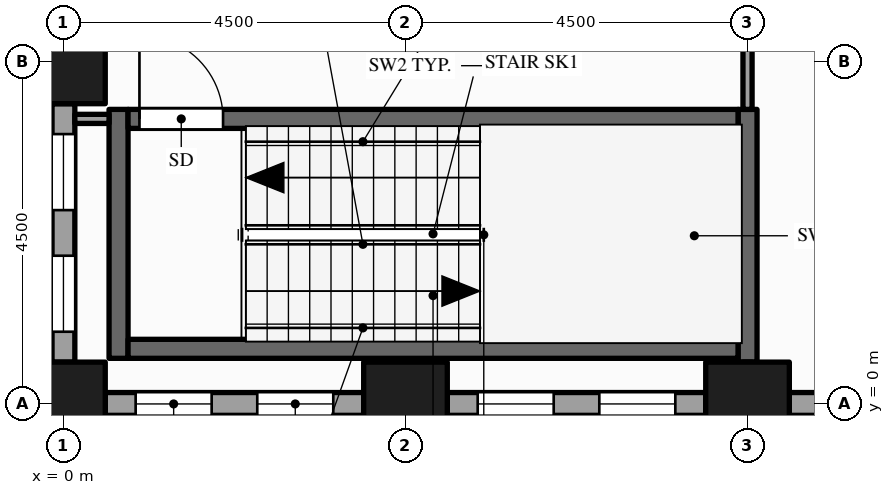
"""IFC4 building model, lengths in metres.
Left out: names, types, materials, properties, quantities, classifications, styles, units other than length and angle.
Written with IfcOpenShell. Run it as: python <this file> out.ifc"""

import sys

from ifc_helpers import new_model, si_unit, direction, frame, frame_2d, origin, origin_2d, place, context, subcontext, project, spatial, rectangle, hollow_rectangle, extrude, element, fill, save


model = new_model("IFC4")
c1 = context("Model", 3, precision=1e-05, world=origin(), true_north=direction((0.0, 1.0)))
c2 = subcontext(c1, "Body", "Model", "MODEL_VIEW")
j1 = project(units=[si_unit("LENGTHUNIT", "METRE"), si_unit("PLANEANGLEUNIT", "RADIAN")], contexts=[c1])
p1 = place(None, origin())
s1 = spatial("IfcSite", under=j1, at=p1, CompositionType="ELEMENT")
p2 = place(p1, origin())
s2 = spatial("IfcBuilding", under=s1, at=p2, CompositionType="ELEMENT")
p3 = place(p2, frame((0.0, 0.0, 49.0)))
s3 = spatial("IfcBuildingStorey", under=s2, at=p3, CompositionType="ELEMENT", Elevation=49.0)
for number, where, z_axis, x_axis in (
    (1, (0.0, 0.0, -0.15), (0.0, 0.0, 1.0), (1.0, 0.0, 0.0)),
    (2, (0.0, 4.5, -0.15), (0.0, 0.0, 1.0), (1.0, 0.0, 0.0)),
    (3, (4.5, 0.0, -0.15), (0.0, 0.0, 1.0), (1.0, 0.0, 0.0)),
    (4, (9.0, 0.0, -0.15), (0.0, 0.0, 1.0), (1.0, 0.0, 0.0)),
):
    element("IfcColumn", number, at=place(p3, frame(where, z_axis=z_axis, x_axis=x_axis)), inside=s3, PredefinedType="COLUMN", context=c2, shape_type="SweptSolid", body=[
        extrude(hollow_rectangle(XDim=1.1, YDim=1.1, WallThickness=0.06, at=origin_2d()), origin(), (0.0, 0.0, 1.0), 4.0),
    ])
p4 = place(p3, frame((0.55, 0.0, 0.0), z_axis=(0.0, 0.0, 1.0), x_axis=(1.0, 0.0, 0.0)))
e5 = element("IfcWall", 5, at=p4, inside=s3, PredefinedType="STANDARD", context=c2, shape_type="SweptSolid", body=[
    extrude(rectangle(XDim=3.4, YDim=0.3, at=frame_2d((1.7, 0.0))), origin(), (0.0, 0.0, 1.0), 3.144),
])
p5 = place(p4, frame((0.4, 0.0, 0.9)))
e6 = element("IfcOpeningElement", 6, at=p5, cuts=e5, PredefinedType="OPENING", context=c2, shape_type="SweptSolid", body=[
    extrude(rectangle(XDim=1.0, YDim=2.0, at=frame_2d((0.5, 1.0))), frame((0.0, 0.16, 0.0), z_axis=(0.0, -1.0, 0.0), x_axis=(1.0, 0.0, 0.0)), (0.0, 0.0, 1.0), 0.32),
])
p6 = place(p4, frame((2.0, 0.0, 0.9)))
e7 = element("IfcOpeningElement", 7, at=p6, cuts=e5, PredefinedType="OPENING", context=c2, shape_type="SweptSolid", body=[
    extrude(rectangle(XDim=1.0, YDim=2.0, at=frame_2d((0.5, 1.0))), frame((0.0, 0.16, 0.0), z_axis=(0.0, -1.0, 0.0), x_axis=(1.0, 0.0, 0.0)), (0.0, 0.0, 1.0), 0.32),
])
p7 = place(p3, frame((5.05, 0.0, 0.0), z_axis=(0.0, 0.0, 1.0), x_axis=(1.0, 0.0, 0.0)))
e8 = element("IfcWall", 8, at=p7, inside=s3, PredefinedType="STANDARD", context=c2, shape_type="SweptSolid", body=[
    extrude(rectangle(XDim=3.4, YDim=0.3, at=frame_2d((1.7, 0.0))), origin(), (0.0, 0.0, 1.0), 3.144),
])
p8 = place(p7, frame((0.4, 0.0, 0.9)))
e9 = element("IfcOpeningElement", 9, at=p8, cuts=e8, PredefinedType="OPENING", context=c2, shape_type="SweptSolid", body=[
    extrude(rectangle(XDim=1.0, YDim=2.0, at=frame_2d((0.5, 1.0))), frame((0.0, 0.16, 0.0), z_axis=(0.0, -1.0, 0.0), x_axis=(1.0, 0.0, 0.0)), (0.0, 0.0, 1.0), 0.32),
])
p9 = place(p7, frame((2.0, 0.0, 0.9)))
e10 = element("IfcOpeningElement", 10, at=p9, cuts=e8, PredefinedType="OPENING", context=c2, shape_type="SweptSolid", body=[
    extrude(rectangle(XDim=1.0, YDim=2.0, at=frame_2d((0.5, 1.0))), frame((0.0, 0.16, 0.0), z_axis=(0.0, -1.0, 0.0), x_axis=(1.0, 0.0, 0.0)), (0.0, 0.0, 1.0), 0.32),
])
p10 = place(p3, frame((9.55, 0.0, 0.0), z_axis=(0.0, 0.0, 1.0), x_axis=(1.0, 0.0, 0.0)))
e11 = element("IfcWall", 11, at=p10, inside=s3, PredefinedType="STANDARD", context=c2, shape_type="SweptSolid", body=[
    extrude(rectangle(XDim=3.4, YDim=0.3, at=frame_2d((1.7, 0.0))), origin(), (0.0, 0.0, 1.0), 3.144),
])
p11 = place(p10, frame((0.4, 0.0, 0.9)))
e12 = element("IfcOpeningElement", 12, at=p11, cuts=e11, PredefinedType="OPENING", context=c2, shape_type="SweptSolid", body=[
    extrude(rectangle(XDim=1.0, YDim=2.0, at=frame_2d((0.5, 1.0))), frame((0.0, 0.16, 0.0), z_axis=(0.0, -1.0, 0.0), x_axis=(1.0, 0.0, 0.0)), (0.0, 0.0, 1.0), 0.32),
])
p12 = place(p10, frame((2.0, 0.0, 0.9)))
e13 = element("IfcOpeningElement", 13, at=p12, cuts=e11, PredefinedType="OPENING", context=c2, shape_type="SweptSolid", body=[
    extrude(rectangle(XDim=1.0, YDim=2.0, at=frame_2d((0.5, 1.0))), frame((0.0, 0.16, 0.0), z_axis=(0.0, -1.0, 0.0), x_axis=(1.0, 0.0, 0.0)), (0.0, 0.0, 1.0), 0.32),
])
p13 = place(p3, frame((0.0, 3.95, 0.0), z_axis=(0.0, 0.0, 1.0), x_axis=(0.0, -1.0, 0.0)))
e14 = element("IfcWall", 14, at=p13, inside=s3, PredefinedType="STANDARD", context=c2, shape_type="SweptSolid", body=[
    extrude(rectangle(XDim=3.4, YDim=0.3, at=frame_2d((1.7, 0.0))), origin(), (0.0, 0.0, 1.0), 3.144),
])
p14 = place(p13, frame((0.4, 0.0, 0.9)))
e15 = element("IfcOpeningElement", 15, at=p14, cuts=e14, PredefinedType="OPENING", context=c2, shape_type="SweptSolid", body=[
    extrude(rectangle(XDim=1.0, YDim=2.0, at=frame_2d((0.5, 1.0))), frame((0.0, 0.16, 0.0), z_axis=(0.0, -1.0, 0.0), x_axis=(1.0, 0.0, 0.0)), (0.0, 0.0, 1.0), 0.32),
])
p15 = place(p13, frame((2.0, 0.0, 0.9)))
e16 = element("IfcOpeningElement", 16, at=p15, cuts=e14, PredefinedType="OPENING", context=c2, shape_type="SweptSolid", body=[
    extrude(rectangle(XDim=1.0, YDim=2.0, at=frame_2d((0.5, 1.0))), frame((0.0, 0.16, 0.0), z_axis=(0.0, -1.0, 0.0), x_axis=(1.0, 0.0, 0.0)), (0.0, 0.0, 1.0), 0.32),
])
p16 = place(p3, frame((0.725, 0.6, 0.0), z_axis=(0.0, 0.0, 1.0), x_axis=(0.0, 1.0, 0.0)))
e17 = element("IfcWall", 17, at=p16, inside=s3, PredefinedType="SHEAR", context=c2, shape_type="SweptSolid", body=[
    extrude(rectangle(XDim=3.275, YDim=0.25, at=frame_2d((1.637, 0.0))), origin(), (0.0, 0.0, 1.0), 3.85),
])
p17 = place(p3, frame((9.0, 0.15, 0.0), z_axis=(0.0, 0.0, 1.0), x_axis=(0.0, 1.0, 0.0)))
e18 = element("IfcWall", 18, at=p17, inside=s3, PredefinedType="PARTITIONING", context=c2, shape_type="SweptSolid", body=[
    extrude(rectangle(XDim=0.4, YDim=0.12, at=frame_2d((0.2, 0.0))), origin(), (0.0, 0.0, 1.0), 3.85),
])
p18 = place(p3, frame((9.0, 0.55, 0.0), z_axis=(0.0, 0.0, 1.0), x_axis=(0.0, 1.0, 0.0)))
e19 = element("IfcWall", 19, at=p18, inside=s3, PredefinedType="SHEAR", context=c2, shape_type="SweptSolid", body=[
    extrude(rectangle(XDim=3.325, YDim=0.25, at=frame_2d((1.663, 0.0))), origin(), (0.0, 0.0, 1.0), 3.85),
])
p19 = place(p3, frame((9.0, 3.875, 0.0), z_axis=(0.0, 0.0, 1.0), x_axis=(0.0, 1.0, 0.0)))
e20 = element("IfcWall", 20, at=p19, inside=s3, PredefinedType="PARTITIONING", context=c2, shape_type="SweptSolid", body=[
    extrude(rectangle(XDim=3.175, YDim=0.12, at=frame_2d((1.587, 0.0))), origin(), (0.0, 0.0, 1.0), 2.938),
])
p20 = place(p3, frame((0.85, 0.725, 0.0), z_axis=(0.0, 0.0, 1.0), x_axis=(1.0, 0.0, 0.0)))
e21 = element("IfcWall", 21, at=p20, inside=s3, PredefinedType="SHEAR", context=c2, shape_type="SweptSolid", body=[
    extrude(rectangle(XDim=8.025, YDim=0.25, at=frame_2d((4.012, 0.0))), origin(), (0.0, 0.0, 1.0), 3.85),
])
p21 = place(p3, frame((0.15, 3.75, 0.0), z_axis=(0.0, 0.0, 1.0), x_axis=(1.0, 0.0, 0.0)))
e22 = element("IfcWall", 22, at=p21, inside=s3, PredefinedType="PARTITIONING", context=c2, shape_type="SweptSolid", body=[
    extrude(rectangle(XDim=0.45, YDim=0.12, at=frame_2d((0.225, 0.0))), origin(), (0.0, 0.0, 1.0), 3.144),
])
p22 = place(p3, frame((0.85, 3.75, 0.0), z_axis=(0.0, 0.0, 1.0), x_axis=(1.0, 0.0, 0.0)))
e23 = element("IfcWall", 23, at=p22, inside=s3, PredefinedType="SHEAR", context=c2, shape_type="SweptSolid", body=[
    extrude(rectangle(XDim=8.025, YDim=0.25, at=frame_2d((4.012, 0.0))), origin(), (0.0, 0.0, 1.0), 3.85),
])
p23 = place(p22, frame((0.15, 0.0, 0.0)))
e24 = element("IfcOpeningElement", 24, at=p23, cuts=e23, PredefinedType="OPENING", context=c2, shape_type="SweptSolid", body=[
    extrude(rectangle(XDim=1.1, YDim=2.1, at=frame_2d((0.55, 1.05))), frame((0.0, 0.135, 0.0), z_axis=(0.0, -1.0, 0.0), x_axis=(1.0, 0.0, 0.0)), (0.0, 0.0, 1.0), 0.27),
])
p24 = place(p5, origin())
e25 = element("IfcWindow", 25, at=p24, inside=s3, PartitioningType="SINGLE_PANEL", PredefinedType="WINDOW", context=c2, shape_type="SweptSolid", body=[
    extrude(rectangle(XDim=1.0, YDim=2.0, at=frame_2d((0.5, 1.0))), frame((0.0, 0.03, 0.0), z_axis=(0.0, -1.0, 0.0), x_axis=(1.0, 0.0, 0.0)), (0.0, 0.0, 1.0), 0.06),
])
fill(e6, e25)
p25 = place(p6, origin())
e26 = element("IfcWindow", 26, at=p25, inside=s3, PartitioningType="SINGLE_PANEL", PredefinedType="WINDOW", context=c2, shape_type="SweptSolid", body=[
    extrude(rectangle(XDim=1.0, YDim=2.0, at=frame_2d((0.5, 1.0))), frame((0.0, 0.03, 0.0), z_axis=(0.0, -1.0, 0.0), x_axis=(1.0, 0.0, 0.0)), (0.0, 0.0, 1.0), 0.06),
])
fill(e7, e26)
p26 = place(p8, origin())
e27 = element("IfcWindow", 27, at=p26, inside=s3, PartitioningType="SINGLE_PANEL", PredefinedType="WINDOW", context=c2, shape_type="SweptSolid", body=[
    extrude(rectangle(XDim=1.0, YDim=2.0, at=frame_2d((0.5, 1.0))), frame((0.0, 0.03, 0.0), z_axis=(0.0, -1.0, 0.0), x_axis=(1.0, 0.0, 0.0)), (0.0, 0.0, 1.0), 0.06),
])
fill(e9, e27)
p27 = place(p9, origin())
e28 = element("IfcWindow", 28, at=p27, inside=s3, PartitioningType="SINGLE_PANEL", PredefinedType="WINDOW", context=c2, shape_type="SweptSolid", body=[
    extrude(rectangle(XDim=1.0, YDim=2.0, at=frame_2d((0.5, 1.0))), frame((0.0, 0.03, 0.0), z_axis=(0.0, -1.0, 0.0), x_axis=(1.0, 0.0, 0.0)), (0.0, 0.0, 1.0), 0.06),
])
fill(e10, e28)
p28 = place(p14, origin())
e29 = element("IfcWindow", 29, at=p28, inside=s3, PartitioningType="SINGLE_PANEL", PredefinedType="WINDOW", context=c2, shape_type="SweptSolid", body=[
    extrude(rectangle(XDim=1.0, YDim=2.0, at=frame_2d((0.5, 1.0))), frame((0.0, 0.03, 0.0), z_axis=(0.0, -1.0, 0.0), x_axis=(1.0, 0.0, 0.0)), (0.0, 0.0, 1.0), 0.06),
])
fill(e15, e29)
p29 = place(p15, origin())
e30 = element("IfcWindow", 30, at=p29, inside=s3, PartitioningType="SINGLE_PANEL", PredefinedType="WINDOW", context=c2, shape_type="SweptSolid", body=[
    extrude(rectangle(XDim=1.0, YDim=2.0, at=frame_2d((0.5, 1.0))), frame((0.0, 0.03, 0.0), z_axis=(0.0, -1.0, 0.0), x_axis=(1.0, 0.0, 0.0)), (0.0, 0.0, 1.0), 0.06),
])
fill(e16, e30)
p30 = place(p23, origin())
e31 = element("IfcDoor", 31, at=p30, inside=s3, OperationType="SINGLE_SWING_LEFT", PredefinedType="DOOR", context=c2, shape_type="SweptSolid", body=[
    extrude(rectangle(XDim=1.1, YDim=2.1, at=frame_2d((0.55, 1.05))), frame((0.0, 0.025, 0.0), z_axis=(0.0, -1.0, 0.0), x_axis=(1.0, 0.0, 0.0)), (0.0, 0.0, 1.0), 0.05),
])
fill(e24, e31)
save(model, sys.argv[1])
